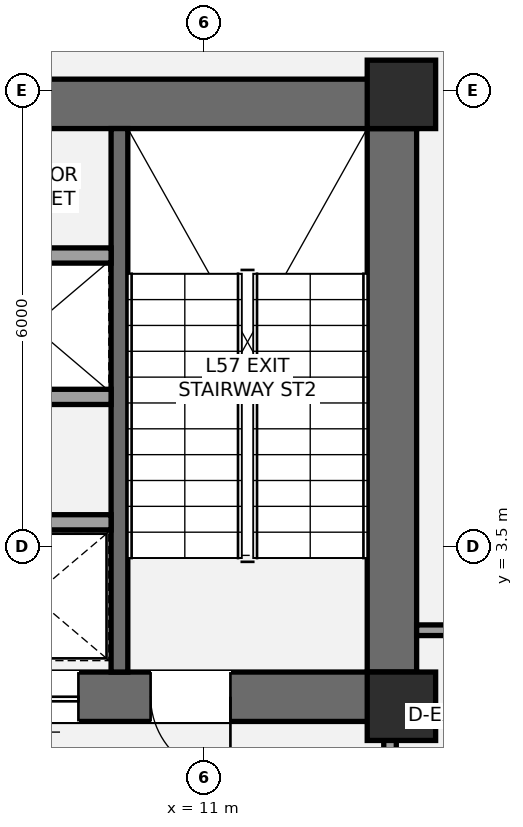
"""IFC4 building model, lengths in metres.
Left out: names, types, materials, properties, quantities, classifications, styles, units other than length and angle.
Written with IfcOpenShell. Run it as: python <this file> out.ifc"""

import sys

from ifc_helpers import new_model, si_unit, direction, frame, frame_2d, origin, origin_2d, place, context, subcontext, project, spatial, rectangle, extrude, element, fill, save


model = new_model("IFC4")
c1 = context("Model", 3, precision=1e-05, world=origin(), true_north=direction((0.0, 1.0)))
c2 = subcontext(c1, "Body", "Model", "MODEL_VIEW")
j1 = project(units=[si_unit("LENGTHUNIT", "METRE"), si_unit("PLANEANGLEUNIT", "RADIAN")], contexts=[c1])
p1 = place(None, origin())
s1 = spatial("IfcSite", under=j1, at=p1, CompositionType="ELEMENT")
p2 = place(p1, origin())
s2 = spatial("IfcBuilding", under=s1, at=p2, CompositionType="ELEMENT")
p3 = place(p2, frame((0.0, 0.0, 205.9)))
s3 = spatial("IfcBuildingStorey", under=s2, at=p3, CompositionType="ELEMENT", Elevation=205.9)
p4 = place(p3, frame((13.475, 1.2, 0.0), z_axis=(0.0, 0.0, 1.0), x_axis=(0.0, 1.0, 0.0)))
e1 = element("IfcWall", 1, at=p4, inside=s3, PredefinedType="SHEAR", context=c2, shape_type="SweptSolid", body=[
    extrude(rectangle(XDim=8.45, YDim=0.65, at=frame_2d((4.225, 0.0))), origin(), (0.0, 0.0, 1.0), 4.1),
])
p5 = place(p3, frame((4.475, 9.325, 0.0), z_axis=(0.0, 0.0, 1.0), x_axis=(1.0, 0.0, 0.0)))
e2 = element("IfcWall", 2, at=p5, inside=s3, PredefinedType="SHEAR", context=c2, shape_type="SweptSolid", body=[
    extrude(rectangle(XDim=9.325, YDim=0.65, at=frame_2d((4.663, 0.0))), origin(), (0.0, 0.0, 1.0), 4.1),
])
p6 = place(p3, frame((13.8, 1.525, 0.0), z_axis=(0.0, 0.0, 1.0), x_axis=(-1.0, 0.0, 0.0)))
e3 = element("IfcWall", 3, at=p6, inside=s3, PredefinedType="SHEAR", context=c2, shape_type="SweptSolid", body=[
    extrude(rectangle(XDim=8.925, YDim=0.65, at=frame_2d((4.462, 0.0))), origin(), (0.0, 0.0, 1.0), 4.1),
])
p7 = place(p6, frame((2.45, 0.0, 0.0)))
e4 = element("IfcOpeningElement", 4, at=p7, cuts=e3, PredefinedType="OPENING", context=c2, shape_type="SweptSolid", body=[
    extrude(rectangle(XDim=1.05, YDim=2.15, at=frame_2d((0.525, 1.075))), frame((0.0, 0.335, 0.0), z_axis=(0.0, -1.0, 0.0), x_axis=(1.0, 0.0, 0.0)), (0.0, 0.0, 1.0), 0.67),
])
p8 = place(p6, frame((4.45, 0.0, 0.0)))
e5 = element("IfcOpeningElement", 5, at=p8, cuts=e3, PredefinedType="OPENING", context=c2, shape_type="SweptSolid", body=[
    extrude(rectangle(XDim=1.1, YDim=2.2, at=frame_2d((0.55, 1.1))), frame((0.0, 0.335, 0.0), z_axis=(0.0, -1.0, 0.0), x_axis=(1.0, 0.0, 0.0)), (0.0, 0.0, 1.0), 0.67),
])
p9 = place(p3, frame((9.89, 1.85, 0.0), z_axis=(0.0, 0.0, 1.0), x_axis=(0.0, 1.0, 0.0)))
e6 = element("IfcWall", 6, at=p9, inside=s3, PredefinedType="SHEAR", context=c2, shape_type="SweptSolid", body=[
    extrude(rectangle(XDim=7.15, YDim=0.22, at=frame_2d((3.575, 0.0))), origin(), (0.0, 0.0, 1.0), 4.1),
])
for number, where, z_axis, x_axis in (
    (7, (13.6, 1.4, 0.0), (0.0, 0.0, 1.0), (1.0, 0.0, 0.0)),
    (8, (13.6, 9.45, 0.0), (0.0, 0.0, 1.0), (1.0, 0.0, 0.0)),
):
    element("IfcColumn", number, at=place(p3, frame(where, z_axis=z_axis, x_axis=x_axis)), inside=s3, PredefinedType="COLUMN", context=c2, shape_type="SweptSolid", body=[
        extrude(rectangle(XDim=0.9, YDim=0.9, at=origin_2d()), origin(), (0.0, 0.0, 1.0), 4.1),
    ])
p10 = place(p3, frame((13.45, -2.15, 0.0), z_axis=(0.0, 0.0, 1.0), x_axis=(0.0, 1.0, 0.0)))
e9 = element("IfcWall", 9, at=p10, inside=s3, PredefinedType="PARTITIONING", context=c2, shape_type="SweptSolid", body=[
    extrude(rectangle(XDim=3.4, YDim=0.165, at=frame_2d((1.7, 0.0))), origin(), (0.0, 0.0, 1.0), 3.92),
])
p11 = place(p10, frame((1.15, 0.0, 0.0)))
e10 = element("IfcOpeningElement", 10, at=p11, cuts=e9, PredefinedType="OPENING", context=c2, shape_type="SweptSolid", body=[
    extrude(rectangle(XDim=1.05, YDim=2.15, at=frame_2d((0.525, 1.075))), frame((0.0, 0.093, 0.0), z_axis=(0.0, -1.0, 0.0), x_axis=(1.0, 0.0, 0.0)), (0.0, 0.0, 1.0), 0.185),
])
p12 = place(p3, frame((5.525, 3.82, 0.0), z_axis=(0.0, 0.0, 1.0), x_axis=(1.0, 0.0, 0.0)))
e11 = element("IfcWall", 11, at=p12, inside=s3, PredefinedType="SOLIDWALL", context=c2, shape_type="SweptSolid", body=[
    extrude(rectangle(XDim=4.255, YDim=0.2, at=frame_2d((2.127, 0.0))), origin(), (0.0, 0.0, 1.0), 3.92),
])
p13 = place(p12, frame((0.65, 0.0, 0.0)))
e12 = element("IfcOpeningElement", 12, at=p13, cuts=e11, PredefinedType="OPENING", context=c2, shape_type="SweptSolid", body=[
    extrude(rectangle(XDim=1.2, YDim=2.2, at=frame_2d((0.6, 1.1))), frame((0.0, 0.11, 0.0), z_axis=(0.0, -1.0, 0.0), x_axis=(1.0, 0.0, 0.0)), (0.0, 0.0, 1.0), 0.22),
])
for number, where, z_axis, x_axis in (
    (13, (5.525, 5.47, 0.0), (0.0, 0.0, 1.0), (1.0, 0.0, 0.0)),
    (14, (5.525, 7.33, 0.0), (0.0, 0.0, 1.0), (1.0, 0.0, 0.0)),
):
    element("IfcWall", number, at=place(p3, frame(where, z_axis=z_axis, x_axis=x_axis)), inside=s3, PredefinedType="SOLIDWALL", context=c2, shape_type="SweptSolid", body=[
        extrude(rectangle(XDim=4.255, YDim=0.2, at=frame_2d((2.127, 0.0))), origin(), (0.0, 0.0, 1.0), 3.92),
    ])
p14 = place(p3, frame((13.8, 2.4, 0.0), z_axis=(0.0, 0.0, 1.0), x_axis=(1.0, 0.0, 0.0)))
e15 = element("IfcWall", 15, at=p14, inside=s3, PredefinedType="PARTITIONING", context=c2, shape_type="SweptSolid", body=[
    extrude(rectangle(XDim=2.4, YDim=0.14, at=frame_2d((1.2, 0.0))), origin(), (0.0, 0.0, 1.0), 3.92),
])
p15 = place(p14, frame((0.44, 0.0, 0.0)))
e16 = element("IfcOpeningElement", 16, at=p15, cuts=e15, PredefinedType="OPENING", context=c2, shape_type="SweptSolid", body=[
    extrude(rectangle(XDim=0.92, YDim=2.15, at=frame_2d((0.46, 1.075))), frame((0.0, 0.08, 0.0), z_axis=(0.0, -1.0, 0.0), x_axis=(1.0, 0.0, 0.0)), (0.0, 0.0, 1.0), 0.16),
])
p16 = place(p7, origin())
e17 = element("IfcDoor", 17, at=p16, inside=s3, OperationType="SINGLE_SWING_LEFT", PredefinedType="DOOR", context=c2, shape_type="SweptSolid", body=[
    extrude(rectangle(XDim=1.05, YDim=2.15, at=frame_2d((0.525, 1.075))), frame((0.0, 0.025, 0.0), z_axis=(0.0, -1.0, 0.0), x_axis=(1.0, 0.0, 0.0)), (0.0, 0.0, 1.0), 0.05),
])
fill(e4, e17)
p17 = place(p8, origin())
e18 = element("IfcDoor", 18, at=p17, inside=s3, OperationType="SLIDING_TO_LEFT", PredefinedType="DOOR", context=c2, shape_type="SweptSolid", body=[
    extrude(rectangle(XDim=1.1, YDim=2.2, at=frame_2d((0.55, 1.1))), frame((0.0, 0.025, 0.0), z_axis=(0.0, -1.0, 0.0), x_axis=(1.0, 0.0, 0.0)), (0.0, 0.0, 1.0), 0.05),
])
fill(e5, e18)
save(model, sys.argv[1])
